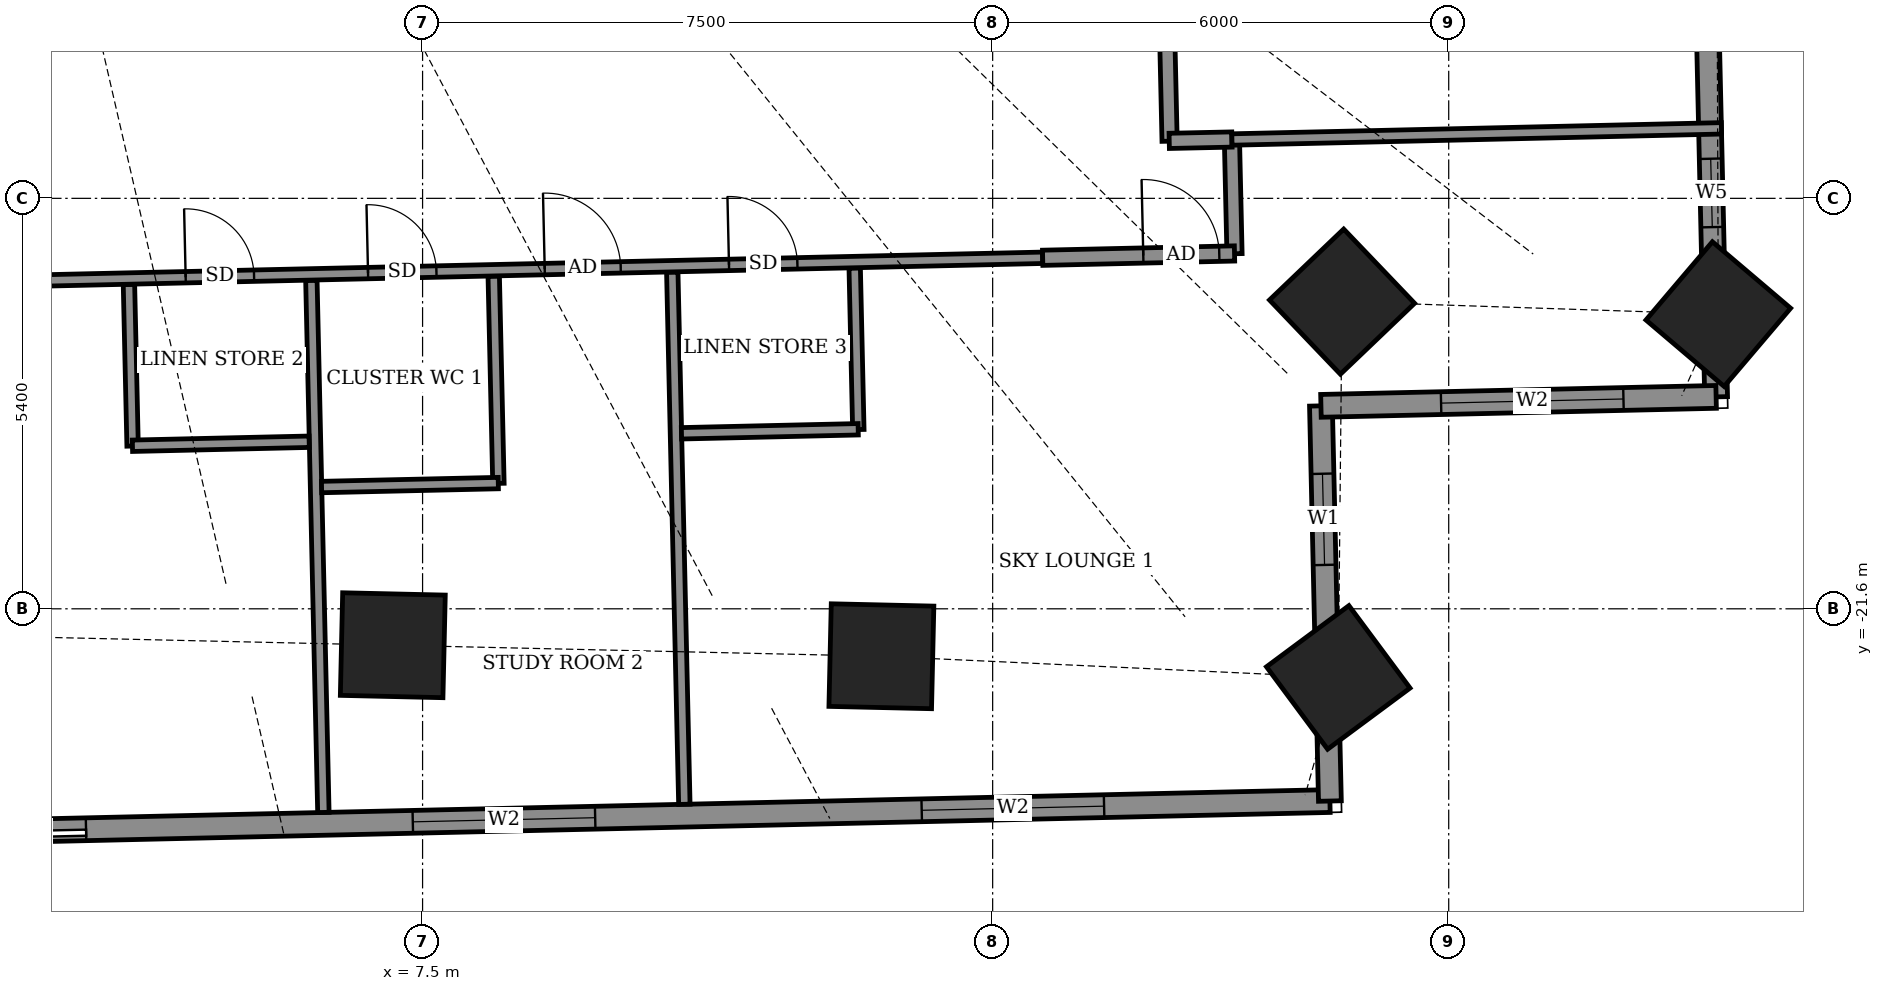
"""IFC4 building model, lengths in metres.
Left out: names, types, materials, properties, quantities, classifications, styles, units other than length and angle.
Written with IfcOpenShell. Run it as: python <this file> out.ifc"""

import sys

from ifc_helpers import new_model, si_unit, direction, frame, frame_2d, origin, origin_2d, place, context, subcontext, project, spatial, rectangle, extrude, element, fill, save


model = new_model("IFC4")
c1 = context("Model", 3, precision=1e-05, world=origin(), true_north=direction((0.0, 1.0)))
c2 = subcontext(c1, "Body", "Model", "MODEL_VIEW")
j1 = project(units=[si_unit("LENGTHUNIT", "METRE"), si_unit("PLANEANGLEUNIT", "RADIAN")], contexts=[c1])
p1 = place(None, origin())
s1 = spatial("IfcSite", under=j1, at=p1, CompositionType="ELEMENT")
p2 = place(p1, origin())
s2 = spatial("IfcBuilding", under=s1, at=p2, CompositionType="ELEMENT")
p3 = place(p2, frame((0.0, 0.0, 125.5)))
s3 = spatial("IfcBuildingStorey", under=s2, at=p3, CompositionType="ELEMENT", Elevation=125.5)
for number, where, z_axis, x_axis in (
    (1, (7.108, -22.079, -0.55), (0.0, 0.0, 1.0), (1.0, -0.023, 0.0)),
    (2, (13.536, -22.224, -0.55), (0.0, 0.0, 1.0), (1.0, -0.023, 0.0)),
    (3, (19.547, -22.503, -0.55), (0.0, 0.0, 1.0), (0.803, 0.596, 0.0)),
    (4, (19.597, -17.559, -0.55), (0.0, 0.0, 1.0), (0.723, 0.691, 0.0)),
    (5, (24.547, -17.723, -0.55), (0.0, 0.0, 1.0), (0.647, 0.762, 0.0)),
):
    element("IfcColumn", number, at=place(p3, frame(where, z_axis=z_axis, x_axis=x_axis)), inside=s3, PredefinedType="COLUMN", context=c2, shape_type="SweptSolid", body=[
        extrude(rectangle(XDim=1.35, YDim=1.35, at=origin_2d()), origin(), (0.0, 0.0, 1.0), 4.6),
    ])
p4 = place(p3, frame((24.518, -18.812, 0.0), z_axis=(0.0, 0.0, 1.0), x_axis=(-0.02269451316, 0.999742446369, 0.0)))
e6 = element("IfcWall", 6, at=p4, inside=s3, PredefinedType="SOLIDWALL", context=c2, shape_type="SweptSolid", body=[
    extrude(rectangle(XDim=10.93, YDim=0.3, at=frame_2d((5.465, 0.0))), origin(), (0.0, 0.0, 1.0), 2.65),
])
p5 = place(p4, frame((2.234, 0.0, 0.9)))
e7 = element("IfcOpeningElement", 7, at=p5, cuts=e6, PredefinedType="OPENING", context=c2, shape_type="SweptSolid", body=[
    extrude(rectangle(XDim=0.9, YDim=1.5, at=frame_2d((0.45, 0.75))), frame((0.0, 0.16, 0.0), z_axis=(0.0, -1.0, 0.0), x_axis=(1.0, 0.0, 0.0)), (0.0, 0.0, 1.0), 0.32),
])
p6 = place(p4, frame((8.328, 0.0, 0.0)))
e8 = element("IfcOpeningElement", 8, at=p6, cuts=e6, PredefinedType="OPENING", context=c2, shape_type="SweptSolid", body=[
    extrude(rectangle(XDim=1.5, YDim=2.4, at=frame_2d((0.75, 1.2))), frame((0.0, 0.16, 0.0), z_axis=(0.0, -1.0, 0.0), x_axis=(1.0, 0.0, 0.0)), (0.0, 0.0, 1.0), 0.32),
])
p7 = place(p3, frame((-22.396, -25.078, 0.0), z_axis=(0.0, 0.0, 1.0), x_axis=(0.99974279854, 0.022678993965, 0.0)))
e9 = element("IfcWall", 9, at=p7, inside=s3, PredefinedType="SOLIDWALL", context=c2, shape_type="SweptSolid", body=[
    extrude(rectangle(XDim=41.844, YDim=0.3, at=frame_2d((20.922, 0.0))), origin(), (0.0, 0.0, 1.0), 2.75),
])
p8 = place(p7, frame((1.475, 0.0, 0.0)))
e10 = element("IfcOpeningElement", 10, at=p8, cuts=e9, PredefinedType="OPENING", context=c2, shape_type="SweptSolid", body=[
    extrude(rectangle(XDim=1.5, YDim=2.4, at=frame_2d((0.75, 1.2))), frame((0.0, 0.16, 0.0), z_axis=(0.0, -1.0, 0.0), x_axis=(1.0, 0.0, 0.0)), (0.0, 0.0, 1.0), 0.32),
])
p9 = place(p7, frame((6.475, 0.0, 0.9)))
e11 = element("IfcOpeningElement", 11, at=p9, cuts=e9, PredefinedType="OPENING", context=c2, shape_type="SweptSolid", body=[
    extrude(rectangle(XDim=2.4, YDim=1.5, at=frame_2d((1.2, 0.75))), frame((0.0, 0.16, 0.0), z_axis=(0.0, -1.0, 0.0), x_axis=(1.0, 0.0, 0.0)), (0.0, 0.0, 1.0), 0.32),
])
p10 = place(p7, frame((12.525, 0.0, 0.0)))
e12 = element("IfcOpeningElement", 12, at=p10, cuts=e9, PredefinedType="OPENING", context=c2, shape_type="SweptSolid", body=[
    extrude(rectangle(XDim=1.5, YDim=2.4, at=frame_2d((0.75, 1.2))), frame((0.0, 0.16, 0.0), z_axis=(0.0, -1.0, 0.0), x_axis=(1.0, 0.0, 0.0)), (0.0, 0.0, 1.0), 0.32),
])
p11 = place(p7, frame((17.575, 0.0, 0.0)))
e13 = element("IfcOpeningElement", 13, at=p11, cuts=e9, PredefinedType="OPENING", context=c2, shape_type="SweptSolid", body=[
    extrude(rectangle(XDim=1.5, YDim=2.4, at=frame_2d((0.75, 1.2))), frame((0.0, 0.16, 0.0), z_axis=(0.0, -1.0, 0.0), x_axis=(1.0, 0.0, 0.0)), (0.0, 0.0, 1.0), 0.32),
])
p12 = place(p7, frame((23.975, 0.0, 0.0)))
e14 = element("IfcOpeningElement", 14, at=p12, cuts=e9, PredefinedType="OPENING", context=c2, shape_type="SweptSolid", body=[
    extrude(rectangle(XDim=1.5, YDim=2.4, at=frame_2d((0.75, 1.2))), frame((0.0, 0.16, 0.0), z_axis=(0.0, -1.0, 0.0), x_axis=(1.0, 0.0, 0.0)), (0.0, 0.0, 1.0), 0.32),
])
p13 = place(p7, frame((29.775, 0.0, 0.9)))
e15 = element("IfcOpeningElement", 15, at=p13, cuts=e9, PredefinedType="OPENING", context=c2, shape_type="SweptSolid", body=[
    extrude(rectangle(XDim=2.4, YDim=1.5, at=frame_2d((1.2, 0.75))), frame((0.0, 0.16, 0.0), z_axis=(0.0, -1.0, 0.0), x_axis=(1.0, 0.0, 0.0)), (0.0, 0.0, 1.0), 0.32),
])
p14 = place(p7, frame((36.472, 0.0, 0.9)))
e16 = element("IfcOpeningElement", 16, at=p14, cuts=e9, PredefinedType="OPENING", context=c2, shape_type="SweptSolid", body=[
    extrude(rectangle(XDim=2.4, YDim=1.5, at=frame_2d((1.2, 0.75))), frame((0.0, 0.16, 0.0), z_axis=(0.0, -1.0, 0.0), x_axis=(1.0, 0.0, 0.0)), (0.0, 0.0, 1.0), 0.32),
])
p15 = place(p3, frame((19.437, -24.129, 0.0), z_axis=(0.0, 0.0, 1.0), x_axis=(-0.022675548694, 0.99974287669, 0.0)))
e17 = element("IfcWall", 17, at=p15, inside=s3, PredefinedType="SOLIDWALL", context=c2, shape_type="SweptSolid", body=[
    extrude(rectangle(XDim=5.2, YDim=0.3, at=frame_2d((2.6, 0.0))), origin(), (0.0, 0.0, 1.0), 2.65),
])
p16 = place(p15, frame((3.107, 0.0, 0.9)))
e18 = element("IfcOpeningElement", 18, at=p16, cuts=e17, PredefinedType="OPENING", context=c2, shape_type="SweptSolid", body=[
    extrude(rectangle(XDim=1.2, YDim=1.5, at=frame_2d((0.6, 0.75))), frame((0.0, 0.16, 0.0), z_axis=(0.0, -1.0, 0.0), x_axis=(1.0, 0.0, 0.0)), (0.0, 0.0, 1.0), 0.32),
])
p17 = place(p3, frame((19.319, -18.93, 0.0), z_axis=(0.0, 0.0, 1.0), x_axis=(0.99974287669, 0.022675548694, 0.0)))
e19 = element("IfcWall", 19, at=p17, inside=s3, PredefinedType="SOLIDWALL", context=c2, shape_type="SweptSolid", body=[
    extrude(rectangle(XDim=5.2, YDim=0.3, at=frame_2d((2.6, 0.0))), origin(), (0.0, 0.0, 1.0), 2.65),
])
p18 = place(p17, frame((1.581, 0.0, 0.9)))
e20 = element("IfcOpeningElement", 20, at=p18, cuts=e19, PredefinedType="OPENING", context=c2, shape_type="SweptSolid", body=[
    extrude(rectangle(XDim=2.4, YDim=1.5, at=frame_2d((1.2, 0.75))), frame((0.0, 0.16, 0.0), z_axis=(0.0, -1.0, 0.0), x_axis=(1.0, 0.0, 0.0)), (0.0, 0.0, 1.0), 0.32),
])
p19 = place(p3, frame((6.195, -24.279, 0.0), z_axis=(0.0, 0.0, 1.0), x_axis=(-0.022562972274, 0.999745423737, 0.0)))
e21 = element("IfcWall", 21, at=p19, inside=s3, PredefinedType="PARTITIONING", context=c2, shape_type="SweptSolid", body=[
    extrude(rectangle(XDim=7.001, YDim=0.15, at=frame_2d((3.5, 0.0))), origin(), (0.0, 0.0, 1.0), 2.65),
])
p20 = place(p3, frame((10.944, -24.172, 0.0), z_axis=(0.0, 0.0, 1.0), x_axis=(-0.022734078158, 0.999741547446, 0.0)))
e22 = element("IfcWall", 22, at=p20, inside=s3, PredefinedType="PARTITIONING", context=c2, shape_type="SweptSolid", body=[
    extrude(rectangle(XDim=7.002, YDim=0.15, at=frame_2d((3.501, 0.0))), origin(), (0.0, 0.0, 1.0), 2.65),
])
p21 = place(p3, frame((8.498, -19.95, 0.0), z_axis=(0.0, 0.0, 1.0), x_axis=(-0.022751926344, 0.99974114142, 0.0)))
e23 = element("IfcWall", 23, at=p21, inside=s3, PredefinedType="PARTITIONING", context=c2, shape_type="SweptSolid", body=[
    extrude(rectangle(XDim=2.726, YDim=0.15, at=frame_2d((1.363, 0.0))), origin(), (0.0, 0.0, 1.0), 2.85),
])
p22 = place(p3, frame((6.171, -19.998, 0.0), z_axis=(0.0, 0.0, 1.0), x_axis=(0.999750007167, 0.022358961731, 0.0)))
e24 = element("IfcWall", 24, at=p22, inside=s3, PredefinedType="PARTITIONING", context=c2, shape_type="SweptSolid", body=[
    extrude(rectangle(XDim=2.326, YDim=0.15, at=frame_2d((1.163, 0.0))), origin(), (0.0, 0.0, 1.0), 4.05),
])
p23 = place(p3, frame((3.685, -19.459, 0.0), z_axis=(0.0, 0.0, 1.0), x_axis=(-0.022627477169, 0.999743965862, 0.0)))
e25 = element("IfcWall", 25, at=p23, inside=s3, PredefinedType="PARTITIONING", context=c2, shape_type="SweptSolid", body=[
    extrude(rectangle(XDim=2.125, YDim=0.15, at=frame_2d((1.063, 0.0))), origin(), (0.0, 0.0, 1.0), 2.85),
])
p24 = place(p3, frame((13.233, -19.242, 0.0), z_axis=(0.0, 0.0, 1.0), x_axis=(-0.022523020646, 0.999746324595, 0.0)))
e26 = element("IfcWall", 26, at=p24, inside=s3, PredefinedType="PARTITIONING", context=c2, shape_type="SweptSolid", body=[
    extrude(rectangle(XDim=2.125, YDim=0.15, at=frame_2d((1.062, 0.0))), origin(), (0.0, 0.0, 1.0), 2.75),
])
for number, where, z_axis, x_axis in (
    (27, (3.683, -19.455, 0.0), (0.0, 0.0, 1.0), (1.0, 0.023, 0.0)),
    (28, (10.906, -19.291, 0.0), (0.0, 0.0, 1.0), (1.0, 0.023, 0.0)),
):
    element("IfcWall", number, at=place(p3, frame(where, z_axis=z_axis, x_axis=x_axis)), inside=s3, PredefinedType="PARTITIONING", context=c2, shape_type="SweptSolid", body=[
        extrude(rectangle(XDim=2.325, YDim=0.15, at=frame_2d((1.163, 0.0))), origin(), (0.0, 0.0, 1.0), 2.85),
    ])
p25 = place(p3, frame((18.182, -16.929, 0.0), z_axis=(0.0, 0.0, 1.0), x_axis=(-0.022632637625, 0.99974384905, 0.0)))
e29 = element("IfcWall", 29, at=p25, inside=s3, PredefinedType="PARTITIONING", context=c2, shape_type="SweptSolid", body=[
    extrude(rectangle(XDim=1.5, YDim=0.2, at=frame_2d((0.75, 0.0))), origin(), (0.0, 0.0, 1.0), 2.85),
])
p26 = place(p3, frame((-14.871, -17.675, 0.0), z_axis=(0.0, 0.0, 1.0), x_axis=(0.999742359486, 0.02269834024, 0.0)))
e30 = element("IfcWall", 30, at=p26, inside=s3, PredefinedType="PARTITIONING", context=c2, shape_type="SweptSolid", body=[
    extrude(rectangle(XDim=30.536, YDim=0.15, at=frame_2d((15.268, 0.0))), origin(), (0.0, 0.0, 1.0), 2.75),
])
p27 = place(p26, frame((0.784, 0.0, 0.0)))
e31 = element("IfcOpeningElement", 31, at=p27, cuts=e30, PredefinedType="OPENING", context=c2, shape_type="SweptSolid", body=[
    extrude(rectangle(XDim=1.0, YDim=2.1, at=frame_2d((0.5, 1.05))), frame((0.0, 0.085, 0.0), z_axis=(0.0, -1.0, 0.0), x_axis=(1.0, 0.0, 0.0)), (0.0, 0.0, 1.0), 0.17),
])
p28 = place(p26, frame((3.934, 0.0, 0.0)))
e32 = element("IfcOpeningElement", 32, at=p28, cuts=e30, PredefinedType="OPENING", context=c2, shape_type="SweptSolid", body=[
    extrude(rectangle(XDim=0.9, YDim=2.1, at=frame_2d((0.45, 1.05))), frame((0.0, 0.085, 0.0), z_axis=(0.0, -1.0, 0.0), x_axis=(1.0, 0.0, 0.0)), (0.0, 0.0, 1.0), 0.17),
])
p29 = place(p26, frame((11.384, 0.0, 0.0)))
e33 = element("IfcOpeningElement", 33, at=p29, cuts=e30, PredefinedType="OPENING", context=c2, shape_type="SweptSolid", body=[
    extrude(rectangle(XDim=0.9, YDim=2.1, at=frame_2d((0.45, 1.05))), frame((0.0, 0.085, 0.0), z_axis=(0.0, -1.0, 0.0), x_axis=(1.0, 0.0, 0.0)), (0.0, 0.0, 1.0), 0.17),
])
p30 = place(p26, frame((15.334, 0.0, 0.0)))
e34 = element("IfcOpeningElement", 34, at=p30, cuts=e30, PredefinedType="OPENING", context=c2, shape_type="SweptSolid", body=[
    extrude(rectangle(XDim=1.0, YDim=2.1, at=frame_2d((0.5, 1.05))), frame((0.0, 0.085, 0.0), z_axis=(0.0, -1.0, 0.0), x_axis=(1.0, 0.0, 0.0)), (0.0, 0.0, 1.0), 0.17),
])
p31 = place(p26, frame((19.259, 0.0, 0.0)))
e35 = element("IfcOpeningElement", 35, at=p31, cuts=e30, PredefinedType="OPENING", context=c2, shape_type="SweptSolid", body=[
    extrude(rectangle(XDim=0.9, YDim=2.1, at=frame_2d((0.45, 1.05))), frame((0.0, 0.085, 0.0), z_axis=(0.0, -1.0, 0.0), x_axis=(1.0, 0.0, 0.0)), (0.0, 0.0, 1.0), 0.17),
])
p32 = place(p26, frame((23.984, 0.0, 0.0)))
e36 = element("IfcOpeningElement", 36, at=p32, cuts=e30, PredefinedType="OPENING", context=c2, shape_type="SweptSolid", body=[
    extrude(rectangle(XDim=1.0, YDim=2.1, at=frame_2d((0.5, 1.05))), frame((0.0, 0.085, 0.0), z_axis=(0.0, -1.0, 0.0), x_axis=(1.0, 0.0, 0.0)), (0.0, 0.0, 1.0), 0.17),
])
p33 = place(p26, frame((21.659, 0.0, 0.0)))
e37 = element("IfcOpeningElement", 37, at=p33, cuts=e30, PredefinedType="OPENING", context=c2, shape_type="SweptSolid", body=[
    extrude(rectangle(XDim=0.9, YDim=2.1, at=frame_2d((0.45, 1.05))), frame((0.0, 0.085, 0.0), z_axis=(0.0, -1.0, 0.0), x_axis=(1.0, 0.0, 0.0)), (0.0, 0.0, 1.0), 0.17),
])
p34 = place(p26, frame((26.409, 0.0, 0.0)))
e38 = element("IfcOpeningElement", 38, at=p34, cuts=e30, PredefinedType="OPENING", context=c2, shape_type="SweptSolid", body=[
    extrude(rectangle(XDim=0.9, YDim=2.1, at=frame_2d((0.45, 1.05))), frame((0.0, 0.085, 0.0), z_axis=(0.0, -1.0, 0.0), x_axis=(1.0, 0.0, 0.0)), (0.0, 0.0, 1.0), 0.17),
])
p35 = place(p3, frame((15.658, -16.982, 0.0), z_axis=(0.0, 0.0, 1.0), x_axis=(0.9997461113, 0.022532486354, 0.0)))
e39 = element("IfcWall", 39, at=p35, inside=s3, PredefinedType="PARTITIONING", context=c2, shape_type="SweptSolid", body=[
    extrude(rectangle(XDim=2.525, YDim=0.2, at=frame_2d((1.262, 0.0))), origin(), (0.0, 0.0, 1.0), 2.85),
])
p36 = place(p35, frame((1.324, 0.0, 0.0)))
e40 = element("IfcOpeningElement", 40, at=p36, cuts=e39, PredefinedType="OPENING", context=c2, shape_type="SweptSolid", body=[
    extrude(rectangle(XDim=1.0, YDim=2.1, at=frame_2d((0.5, 1.05))), frame((0.0, 0.11, 0.0), z_axis=(0.0, -1.0, 0.0), x_axis=(1.0, 0.0, 0.0)), (0.0, 0.0, 1.0), 0.22),
])
p37 = place(p3, frame((17.328, -15.448, 0.0), z_axis=(0.0, 0.0, 1.0), x_axis=(-0.022680883318, 0.999742755679, 0.0)))
e41 = element("IfcWall", 41, at=p37, inside=s3, PredefinedType="PARTITIONING", context=c2, shape_type="SweptSolid", body=[
    extrude(rectangle(XDim=7.664, YDim=0.2, at=frame_2d((3.832, 0.0))), origin(), (0.0, 0.0, 1.0), 2.85),
])
p38 = place(p37, frame((3.23, 0.0, 0.0)))
e42 = element("IfcOpeningElement", 42, at=p38, cuts=e41, PredefinedType="OPENING", context=c2, shape_type="SweptSolid", body=[
    extrude(rectangle(XDim=1.0, YDim=2.1, at=frame_2d((0.5, 1.05))), frame((0.0, 0.11, 0.0), z_axis=(0.0, -1.0, 0.0), x_axis=(1.0, 0.0, 0.0)), (0.0, 0.0, 1.0), 0.22),
])
p39 = place(p3, frame((17.323, -15.444, 0.0), z_axis=(0.0, 0.0, 1.0), x_axis=(0.999760281873, 0.021894720586, 0.0)))
e43 = element("IfcWall", 43, at=p39, inside=s3, PredefinedType="PARTITIONING", context=c2, shape_type="SweptSolid", body=[
    extrude(rectangle(XDim=0.825, YDim=0.2, at=frame_2d((0.413, 0.0))), origin(), (0.0, 0.0, 1.0), 4.05),
])
p40 = place(p3, frame((18.148, -15.426, 0.0), z_axis=(0.0, 0.0, 1.0), x_axis=(0.999739678733, 0.022816107612, 0.0)))
e44 = element("IfcWall", 44, at=p40, inside=s3, PredefinedType="PARTITIONING", context=c2, shape_type="SweptSolid", body=[
    extrude(rectangle(XDim=6.442, YDim=0.15, at=frame_2d((3.221, 0.0))), origin(), (0.0, 0.0, 1.0), 2.65),
])
p41 = place(p5, origin())
e45 = element("IfcWindow", 45, at=p41, inside=s3, PartitioningType="SINGLE_PANEL", PredefinedType="WINDOW", context=c2, shape_type="SweptSolid", body=[
    extrude(rectangle(XDim=0.9, YDim=1.5, at=frame_2d((0.45, 0.75))), frame((0.0, 0.03, 0.0), z_axis=(0.0, -1.0, 0.0), x_axis=(1.0, 0.0, 0.0)), (0.0, 0.0, 1.0), 0.06),
])
fill(e7, e45)
p42 = place(p12, origin())
e46 = element("IfcDoor", 46, at=p42, inside=s3, OperationType="SLIDING_TO_LEFT", PredefinedType="DOOR", context=c2, shape_type="SweptSolid", body=[
    extrude(rectangle(XDim=1.5, YDim=2.4, at=frame_2d((0.75, 1.2))), frame((0.0, 0.025, 0.0), z_axis=(0.0, -1.0, 0.0), x_axis=(1.0, 0.0, 0.0)), (0.0, 0.0, 1.0), 0.05),
])
fill(e14, e46)
p43 = place(p13, origin())
e47 = element("IfcWindow", 47, at=p43, inside=s3, PartitioningType="DOUBLE_PANEL_VERTICAL", PredefinedType="WINDOW", context=c2, shape_type="SweptSolid", body=[
    extrude(rectangle(XDim=2.4, YDim=1.5, at=frame_2d((1.2, 0.75))), frame((0.0, 0.03, 0.0), z_axis=(0.0, -1.0, 0.0), x_axis=(1.0, 0.0, 0.0)), (0.0, 0.0, 1.0), 0.06),
])
fill(e15, e47)
p44 = place(p14, origin())
e48 = element("IfcWindow", 48, at=p44, inside=s3, PartitioningType="DOUBLE_PANEL_VERTICAL", PredefinedType="WINDOW", context=c2, shape_type="SweptSolid", body=[
    extrude(rectangle(XDim=2.4, YDim=1.5, at=frame_2d((1.2, 0.75))), frame((0.0, 0.03, 0.0), z_axis=(0.0, -1.0, 0.0), x_axis=(1.0, 0.0, 0.0)), (0.0, 0.0, 1.0), 0.06),
])
fill(e16, e48)
p45 = place(p16, origin())
e49 = element("IfcWindow", 49, at=p45, inside=s3, PartitioningType="SINGLE_PANEL", PredefinedType="WINDOW", context=c2, shape_type="SweptSolid", body=[
    extrude(rectangle(XDim=1.2, YDim=1.5, at=frame_2d((0.6, 0.75))), frame((0.0, 0.03, 0.0), z_axis=(0.0, -1.0, 0.0), x_axis=(1.0, 0.0, 0.0)), (0.0, 0.0, 1.0), 0.06),
])
fill(e18, e49)
p46 = place(p18, origin())
e50 = element("IfcWindow", 50, at=p46, inside=s3, PartitioningType="DOUBLE_PANEL_VERTICAL", PredefinedType="WINDOW", context=c2, shape_type="SweptSolid", body=[
    extrude(rectangle(XDim=2.4, YDim=1.5, at=frame_2d((1.2, 0.75))), frame((0.0, 0.03, 0.0), z_axis=(0.0, -1.0, 0.0), x_axis=(1.0, 0.0, 0.0)), (0.0, 0.0, 1.0), 0.06),
])
fill(e20, e50)
p47 = place(p31, origin())
e51 = element("IfcDoor", 51, at=p47, inside=s3, OperationType="SINGLE_SWING_LEFT", PredefinedType="DOOR", context=c2, shape_type="SweptSolid", body=[
    extrude(rectangle(XDim=0.9, YDim=2.1, at=frame_2d((0.45, 1.05))), frame((0.0, 0.025, 0.0), z_axis=(0.0, -1.0, 0.0), x_axis=(1.0, 0.0, 0.0)), (0.0, 0.0, 1.0), 0.05),
])
fill(e35, e51)
p48 = place(p32, origin())
e52 = element("IfcDoor", 52, at=p48, inside=s3, OperationType="SINGLE_SWING_RIGHT", PredefinedType="DOOR", context=c2, shape_type="SweptSolid", body=[
    extrude(rectangle(XDim=1.0, YDim=2.1, at=frame_2d((0.5, 1.05))), frame((0.0, 0.025, 0.0), z_axis=(0.0, -1.0, 0.0), x_axis=(1.0, 0.0, 0.0)), (0.0, 0.0, 1.0), 0.05),
])
fill(e36, e52)
p49 = place(p33, origin())
e53 = element("IfcDoor", 53, at=p49, inside=s3, OperationType="SINGLE_SWING_RIGHT", PredefinedType="DOOR", context=c2, shape_type="SweptSolid", body=[
    extrude(rectangle(XDim=0.9, YDim=2.1, at=frame_2d((0.45, 1.05))), frame((0.0, 0.025, 0.0), z_axis=(0.0, -1.0, 0.0), x_axis=(1.0, 0.0, 0.0)), (0.0, 0.0, 1.0), 0.05),
])
fill(e37, e53)
p50 = place(p36, origin())
e54 = element("IfcDoor", 54, at=p50, inside=s3, OperationType="SINGLE_SWING_LEFT", PredefinedType="DOOR", context=c2, shape_type="SweptSolid", body=[
    extrude(rectangle(XDim=1.0, YDim=2.1, at=frame_2d((0.5, 1.05))), frame((0.0, 0.025, 0.0), z_axis=(0.0, -1.0, 0.0), x_axis=(1.0, 0.0, 0.0)), (0.0, 0.0, 1.0), 0.05),
])
fill(e40, e54)
p51 = place(p34, origin())
e55 = element("IfcDoor", 55, at=p51, inside=s3, OperationType="SINGLE_SWING_LEFT", PredefinedType="DOOR", context=c2, shape_type="SweptSolid", body=[
    extrude(rectangle(XDim=0.9, YDim=2.1, at=frame_2d((0.45, 1.05))), frame((0.0, 0.025, 0.0), z_axis=(0.0, -1.0, 0.0), x_axis=(1.0, 0.0, 0.0)), (0.0, 0.0, 1.0), 0.05),
])
fill(e38, e55)
save(model, sys.argv[1])
